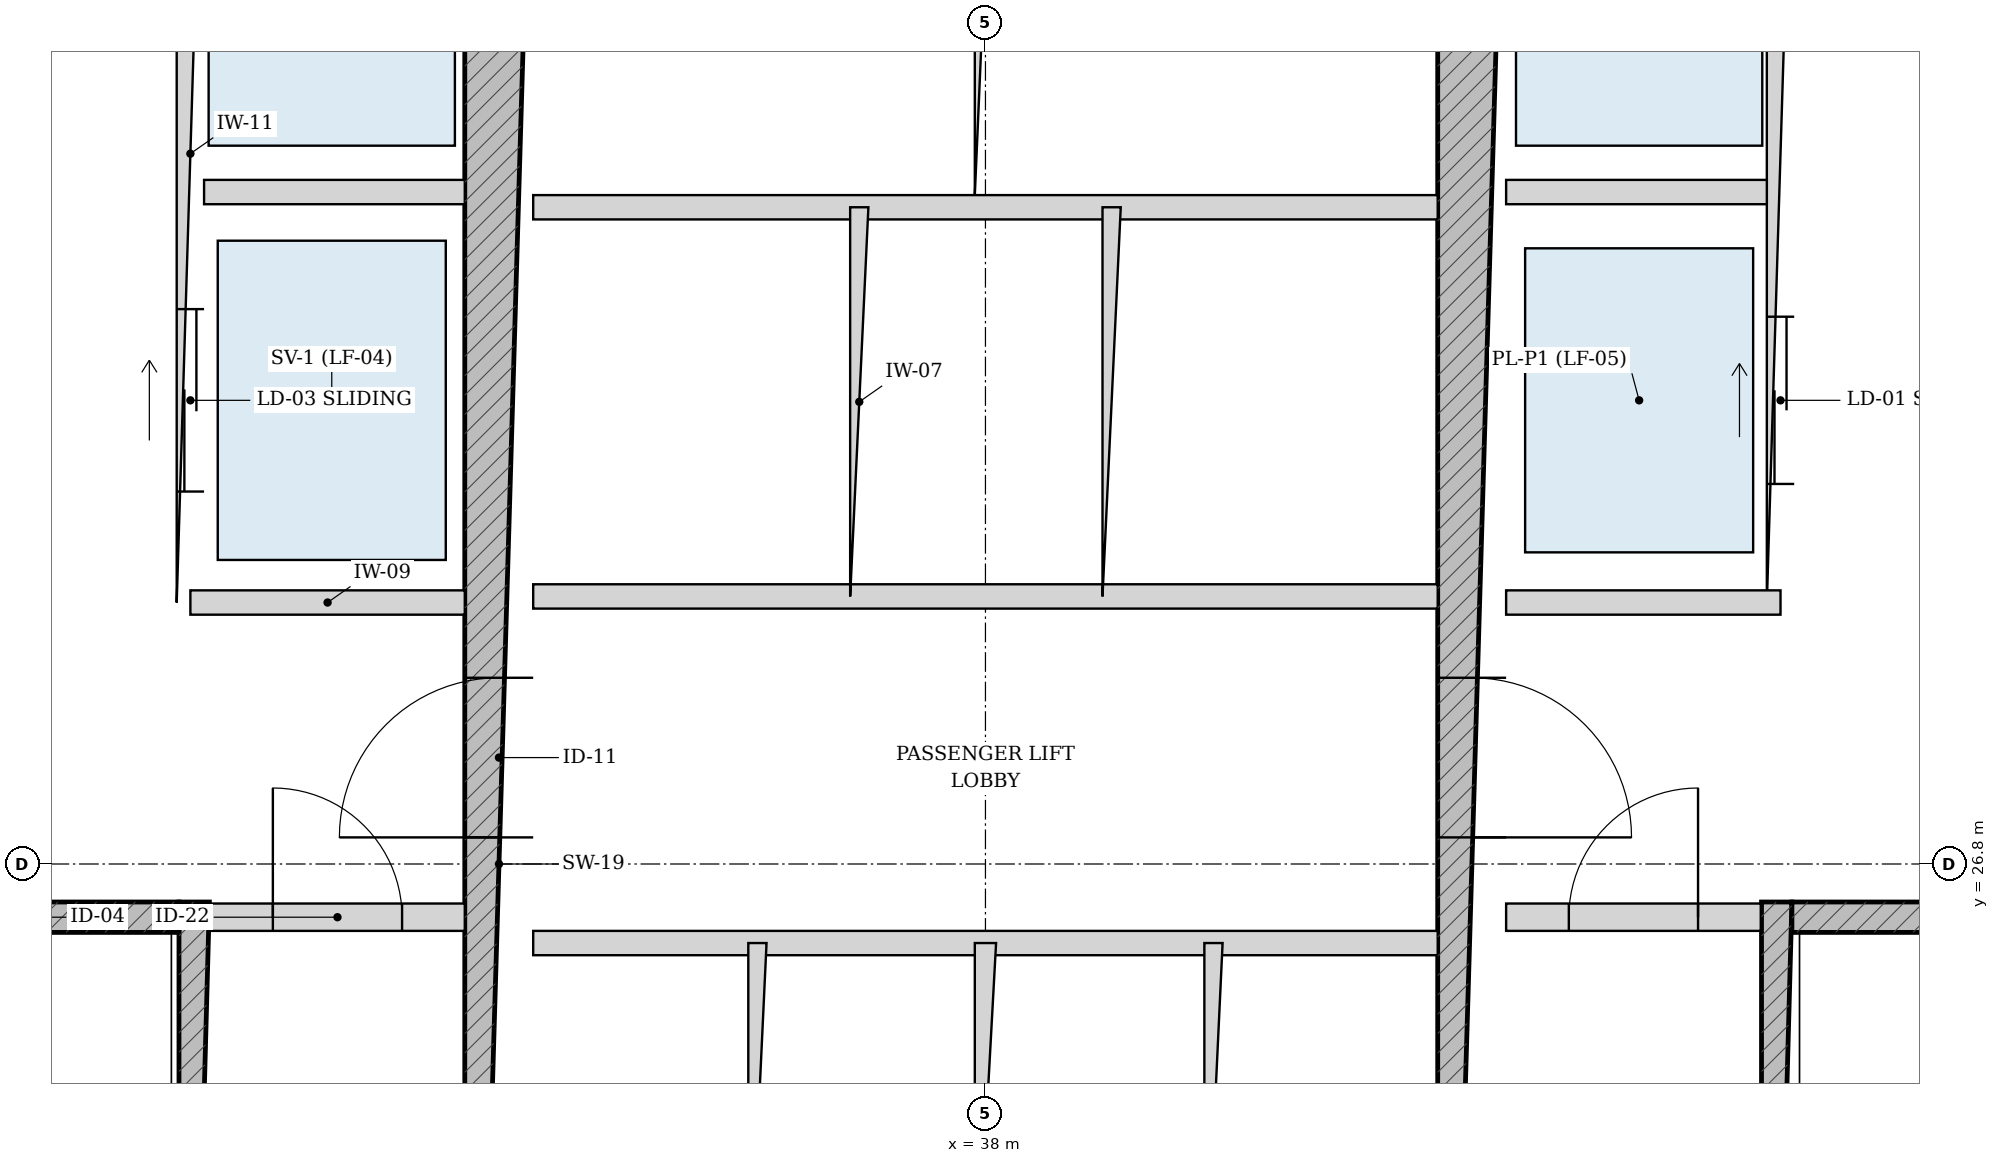
"""IFC4 building model, lengths in metres.
Left out: names, types, materials, properties, quantities, classifications, styles, units other than length and angle.
Written with IfcOpenShell. Run it as: python <this file> out.ifc"""

import sys

from ifc_helpers import new_model, si_unit, direction, frame, frame_2d, origin, place, context, subcontext, project, spatial, rectangle, extrude, source, transform, mapped, element, fill, save


model = new_model("IFC4")
c1 = context("Model", 3, precision=1e-05, world=origin(), true_north=direction((-0.2419218956, 0.970295726276)))
c2 = subcontext(c1, "Body", "Model", "MODEL_VIEW")
j1 = project(units=[si_unit("LENGTHUNIT", "METRE"), si_unit("PLANEANGLEUNIT", "RADIAN")], contexts=[c1])
p1 = place(None, origin())
s1 = spatial("IfcSite", under=j1, at=p1, CompositionType="ELEMENT")
p2 = place(p1, origin())
s2 = spatial("IfcBuilding", under=s1, at=p2, CompositionType="ELEMENT")
p3 = place(p2, frame((0.0, 0.0, -4.2)))
s3 = spatial("IfcBuildingStorey", under=s2, at=p3, CompositionType="ELEMENT", Elevation=-4.2)
p4 = place(p3, frame((32.795, 19.175, 0.0), z_axis=(0.0, 0.0, 1.0), x_axis=(0.0, 1.0, 0.0)))
e1 = element("IfcWall", 1, at=p4, inside=s3, PredefinedType="SOLIDWALL", context=c2, shape_type="SweptSolid", body=[
    extrude(rectangle(XDim=7.375, YDim=0.2, at=frame_2d((3.688, 0.0))), origin(), (0.0, 0.0, 1.0), 3.78),
])
p5 = place(p3, frame((29.375, 26.45, 0.0), z_axis=(0.0, 0.0, 1.0), x_axis=(1.0, 0.0, 0.0)))
e2 = element("IfcWall", 2, at=p5, inside=s3, PredefinedType="SOLIDWALL", context=c2, shape_type="SweptSolid", body=[
    extrude(rectangle(XDim=3.32, YDim=0.2, at=frame_2d((1.66, 0.0))), origin(), (0.0, 0.0, 1.0), 3.78),
])
p6 = place(p5, frame((1.185, 0.0, 0.0)))
e3 = element("IfcOpeningElement", 3, at=p6, cuts=e2, PredefinedType="OPENING", context=c2, shape_type="SweptSolid", body=[
    extrude(rectangle(XDim=0.95, YDim=2.15, at=frame_2d((0.475, 1.075))), frame((0.0, 0.11, 0.0), z_axis=(0.0, -1.0, 0.0), x_axis=(1.0, 0.0, 0.0)), (0.0, 0.0, 1.0), 0.22),
])
p7 = place(p3, frame((43.205, 19.175, 0.0), z_axis=(0.0, 0.0, 1.0), x_axis=(0.0, 1.0, 0.0)))
e4 = element("IfcWall", 4, at=p7, inside=s3, PredefinedType="SOLIDWALL", context=c2, shape_type="SweptSolid", body=[
    extrude(rectangle(XDim=7.375, YDim=0.2, at=frame_2d((3.688, 0.0))), origin(), (0.0, 0.0, 1.0), 3.78),
])
p8 = place(p3, frame((43.305, 26.45, 0.0), z_axis=(0.0, 0.0, 1.0), x_axis=(1.0, 0.0, 0.0)))
e5 = element("IfcWall", 5, at=p8, inside=s3, PredefinedType="SOLIDWALL", context=c2, shape_type="SweptSolid", body=[
    extrude(rectangle(XDim=3.32, YDim=0.2, at=frame_2d((1.66, 0.0))), origin(), (0.0, 0.0, 1.0), 3.78),
])
p9 = place(p8, frame((1.185, 0.0, 0.0)))
e6 = element("IfcOpeningElement", 6, at=p9, cuts=e5, PredefinedType="OPENING", context=c2, shape_type="SweptSolid", body=[
    extrude(rectangle(XDim=0.95, YDim=2.15, at=frame_2d((0.475, 1.075))), frame((0.0, 0.11, 0.0), z_axis=(0.0, -1.0, 0.0), x_axis=(1.0, 0.0, 0.0)), (0.0, 0.0, 1.0), 0.22),
])
p10 = place(p3, frame((34.8, 19.175, 0.0), z_axis=(0.0, 0.0, 1.0), x_axis=(0.0, 1.0, 0.0)))
e7 = element("IfcWall", 7, at=p10, inside=s3, PredefinedType="SHEAR", context=c2, shape_type="SweptSolid", body=[
    extrude(rectangle(XDim=15.25, YDim=0.45, at=frame_2d((7.625, 0.0))), origin(), (0.0, 0.0, 1.0), 3.78),
])
p11 = place(p10, frame((7.8, 0.0, 0.0)))
e8 = element("IfcOpeningElement", 8, at=p11, cuts=e7, PredefinedType="OPENING", context=c2, shape_type="SweptSolid", body=[
    extrude(rectangle(XDim=1.05, YDim=2.15, at=frame_2d((0.525, 1.075))), frame((0.0, 0.235, 0.0), z_axis=(0.0, -1.0, 0.0), x_axis=(1.0, 0.0, 0.0)), (0.0, 0.0, 1.0), 0.47),
])
p12 = place(p3, frame((41.2, 19.175, 0.0), z_axis=(0.0, 0.0, 1.0), x_axis=(0.0, 1.0, 0.0)))
e9 = element("IfcWall", 9, at=p12, inside=s3, PredefinedType="SHEAR", context=c2, shape_type="SweptSolid", body=[
    extrude(rectangle(XDim=15.25, YDim=0.45, at=frame_2d((7.625, 0.0))), origin(), (0.0, 0.0, 1.0), 3.78),
])
p13 = place(p12, frame((7.8, 0.0, 0.0)))
e10 = element("IfcOpeningElement", 10, at=p13, cuts=e9, PredefinedType="OPENING", context=c2, shape_type="SweptSolid", body=[
    extrude(rectangle(XDim=1.05, YDim=2.15, at=frame_2d((0.525, 1.075))), frame((0.0, 0.235, 0.0), z_axis=(0.0, -1.0, 0.0), x_axis=(1.0, 0.0, 0.0)), (0.0, 0.0, 1.0), 0.47),
])
p14 = place(p3, frame((32.9, 26.45, 0.0), z_axis=(0.0, 0.0, 1.0), x_axis=(1.0, 0.0, 0.0)))
e11 = element("IfcWall", 11, at=p14, inside=s3, PredefinedType="PARTITIONING", context=c2, shape_type="SweptSolid", body=[
    extrude(rectangle(XDim=1.675, YDim=0.18, at=frame_2d((0.837, 0.0))), origin(), (0.0, 0.0, 1.0), 3.78),
])
p15 = place(p14, frame((0.413, 0.0, 0.0)))
e12 = element("IfcOpeningElement", 12, at=p15, cuts=e11, PredefinedType="OPENING", context=c2, shape_type="SweptSolid", body=[
    extrude(rectangle(XDim=0.85, YDim=2.1, at=frame_2d((0.425, 1.05))), frame((0.0, 0.1, 0.0), z_axis=(0.0, -1.0, 0.0), x_axis=(1.0, 0.0, 0.0)), (0.0, 0.0, 1.0), 0.2),
])
p16 = place(p3, frame((41.425, 26.45, 0.0), z_axis=(0.0, 0.0, 1.0), x_axis=(1.0, 0.0, 0.0)))
e13 = element("IfcWall", 13, at=p16, inside=s3, PredefinedType="PARTITIONING", context=c2, shape_type="SweptSolid", body=[
    extrude(rectangle(XDim=1.675, YDim=0.18, at=frame_2d((0.837, 0.0))), origin(), (0.0, 0.0, 1.0), 3.78),
])
p17 = place(p16, frame((0.413, 0.0, 0.0)))
e14 = element("IfcOpeningElement", 14, at=p17, cuts=e13, PredefinedType="OPENING", context=c2, shape_type="SweptSolid", body=[
    extrude(rectangle(XDim=0.85, YDim=2.1, at=frame_2d((0.425, 1.05))), frame((0.0, 0.1, 0.0), z_axis=(0.0, -1.0, 0.0), x_axis=(1.0, 0.0, 0.0)), (0.0, 0.0, 1.0), 0.2),
])
p18 = place(p3, frame((32.77, 28.52, 0.0), z_axis=(0.0, 0.0, 1.0), x_axis=(0.0, 1.0, 0.0)))
e15 = element("IfcWall", 15, at=p18, inside=s3, PredefinedType="PARTITIONING", context=c2, shape_type="SweptSolid", body=[
    extrude(rectangle(XDim=5.905, YDim=0.18, at=frame_2d((2.953, 0.0))), origin(), (0.0, 0.0, 1.0), 3.78),
])
p19 = place(p18, frame((3.655, 0.0, 0.0)))
e16 = element("IfcOpeningElement", 16, at=p19, cuts=e15, PredefinedType="OPENING", context=c2, shape_type="SweptSolid", body=[
    extrude(rectangle(XDim=1.15, YDim=2.2, at=frame_2d((0.575, 1.1))), frame((0.0, 0.1, 0.0), z_axis=(0.0, -1.0, 0.0), x_axis=(1.0, 0.0, 0.0)), (0.0, 0.0, 1.0), 0.2),
])
p20 = place(p18, frame((0.73, 0.0, 0.0)))
e17 = element("IfcOpeningElement", 17, at=p20, cuts=e15, PredefinedType="OPENING", context=c2, shape_type="SweptSolid", body=[
    extrude(rectangle(XDim=1.2, YDim=2.25, at=frame_2d((0.6, 1.125))), frame((0.0, 0.1, 0.0), z_axis=(0.0, -1.0, 0.0), x_axis=(1.0, 0.0, 0.0)), (0.0, 0.0, 1.0), 0.2),
])
p21 = place(p3, frame((32.86, 31.22, 0.0), z_axis=(0.0, 0.0, 1.0), x_axis=(1.0, 0.0, 0.0)))
e18 = element("IfcWall", 18, at=p21, inside=s3, PredefinedType="PARTITIONING", context=c2, shape_type="SweptSolid", body=[
    extrude(rectangle(XDim=1.715, YDim=0.16, at=frame_2d((0.857, 0.0))), origin(), (0.0, 0.0, 1.0), 3.78),
])
p22 = place(p3, frame((32.77, 28.52, 0.0), z_axis=(0.0, 0.0, 1.0), x_axis=(1.0, 0.0, 0.0)))
e19 = element("IfcWall", 19, at=p22, inside=s3, PredefinedType="PARTITIONING", context=c2, shape_type="SweptSolid", body=[
    extrude(rectangle(XDim=1.805, YDim=0.16, at=frame_2d((0.902, 0.0))), origin(), (0.0, 0.0, 1.0), 3.78),
])
p23 = place(p3, frame((43.23, 28.52, 0.0), z_axis=(0.0, 0.0, 1.0), x_axis=(0.0, 1.0, 0.0)))
e20 = element("IfcWall", 20, at=p23, inside=s3, PredefinedType="PARTITIONING", context=c2, shape_type="SweptSolid", body=[
    extrude(rectangle(XDim=5.905, YDim=0.18, at=frame_2d((2.953, 0.0))), origin(), (0.0, 0.0, 1.0), 3.78),
])
p24 = place(p23, frame((3.655, 0.0, 0.0)))
e21 = element("IfcOpeningElement", 21, at=p24, cuts=e20, PredefinedType="OPENING", context=c2, shape_type="SweptSolid", body=[
    extrude(rectangle(XDim=1.15, YDim=2.2, at=frame_2d((0.575, 1.1))), frame((0.0, 0.1, 0.0), z_axis=(0.0, -1.0, 0.0), x_axis=(1.0, 0.0, 0.0)), (0.0, 0.0, 1.0), 0.2),
])
p25 = place(p23, frame((0.78, 0.0, 0.0)))
e22 = element("IfcOpeningElement", 22, at=p25, cuts=e20, PredefinedType="OPENING", context=c2, shape_type="SweptSolid", body=[
    extrude(rectangle(XDim=1.1, YDim=2.2, at=frame_2d((0.55, 1.1))), frame((0.0, 0.1, 0.0), z_axis=(0.0, -1.0, 0.0), x_axis=(1.0, 0.0, 0.0)), (0.0, 0.0, 1.0), 0.2),
])
p26 = place(p3, frame((41.425, 31.22, 0.0), z_axis=(0.0, 0.0, 1.0), x_axis=(1.0, 0.0, 0.0)))
e23 = element("IfcWall", 23, at=p26, inside=s3, PredefinedType="PARTITIONING", context=c2, shape_type="SweptSolid", body=[
    extrude(rectangle(XDim=1.715, YDim=0.16, at=frame_2d((0.857, 0.0))), origin(), (0.0, 0.0, 1.0), 3.78),
])
p27 = place(p3, frame((41.425, 28.52, 0.0), z_axis=(0.0, 0.0, 1.0), x_axis=(1.0, 0.0, 0.0)))
e24 = element("IfcWall", 24, at=p27, inside=s3, PredefinedType="PARTITIONING", context=c2, shape_type="SweptSolid", body=[
    extrude(rectangle(XDim=1.805, YDim=0.16, at=frame_2d((0.902, 0.0))), origin(), (0.0, 0.0, 1.0), 3.78),
])
for number, where, z_axis, x_axis in (
    (25, (35.025, 28.56, 0.0), (0.0, 0.0, 1.0), (1.0, 0.0, 0.0)),
    (26, (35.025, 31.12, 0.0), (0.0, 0.0, 1.0), (1.0, 0.0, 0.0)),
):
    element("IfcWall", number, at=place(p3, frame(where, z_axis=z_axis, x_axis=x_axis)), inside=s3, PredefinedType="PARTITIONING", context=c2, shape_type="SweptSolid", body=[
        extrude(rectangle(XDim=5.95, YDim=0.16, at=frame_2d((2.975, 0.0))), origin(), (0.0, 0.0, 1.0), 3.78),
    ])
for number, where, z_axis, x_axis in (
    (27, (37.17, 28.56, 0.0), (0.0, 0.0, 1.0), (0.0, 1.0, 0.0)),
    (28, (38.83, 28.56, 0.0), (0.0, 0.0, 1.0), (0.0, 1.0, 0.0)),
):
    element("IfcWall", number, at=place(p3, frame(where, z_axis=z_axis, x_axis=x_axis)), inside=s3, PredefinedType="PARTITIONING", context=c2, shape_type="SweptSolid", body=[
        extrude(rectangle(XDim=2.56, YDim=0.12, at=frame_2d((1.28, 0.0))), origin(), (0.0, 0.0, 1.0), 3.78),
    ])
p28 = place(p3, frame((38.0, 31.2, 0.0), z_axis=(0.0, 0.0, 1.0), x_axis=(0.0, 1.0, 0.0)))
e29 = element("IfcWall", 29, at=p28, inside=s3, PredefinedType="PARTITIONING", context=c2, shape_type="SweptSolid", body=[
    extrude(rectangle(XDim=3.225, YDim=0.14, at=frame_2d((1.613, 0.0))), origin(), (0.0, 0.0, 1.0), 3.78),
])
p29 = place(p3, frame((35.025, 26.28, 0.0), z_axis=(0.0, 0.0, 1.0), x_axis=(1.0, 0.0, 0.0)))
e30 = element("IfcWall", 30, at=p29, inside=s3, PredefinedType="PARTITIONING", context=c2, shape_type="SweptSolid", body=[
    extrude(rectangle(XDim=5.95, YDim=0.16, at=frame_2d((2.975, 0.0))), origin(), (0.0, 0.0, 1.0), 3.78),
])
p30 = place(p3, frame((36.5, 23.72, 0.0), z_axis=(0.0, 0.0, 1.0), x_axis=(0.0, 1.0, 0.0)))
e31 = element("IfcWall", 31, at=p30, inside=s3, PredefinedType="PARTITIONING", context=c2, shape_type="SweptSolid", body=[
    extrude(rectangle(XDim=2.56, YDim=0.12, at=frame_2d((1.28, 0.0))), origin(), (0.0, 0.0, 1.0), 3.78),
])
p31 = place(p3, frame((38.0, 23.72, 0.0), z_axis=(0.0, 0.0, 1.0), x_axis=(0.0, 1.0, 0.0)))
e32 = element("IfcWall", 32, at=p31, inside=s3, PredefinedType="PARTITIONING", context=c2, shape_type="SweptSolid", body=[
    extrude(rectangle(XDim=2.56, YDim=0.14, at=frame_2d((1.28, 0.0))), origin(), (0.0, 0.0, 1.0), 3.78),
])
p32 = place(p3, frame((39.5, 23.72, 0.0), z_axis=(0.0, 0.0, 1.0), x_axis=(0.0, 1.0, 0.0)))
e33 = element("IfcWall", 33, at=p32, inside=s3, PredefinedType="PARTITIONING", context=c2, shape_type="SweptSolid", body=[
    extrude(rectangle(XDim=2.56, YDim=0.12, at=frame_2d((1.28, 0.0))), origin(), (0.0, 0.0, 1.0), 3.78),
])
m1 = source(origin(), c2, "Body", "SweptSolid", [
    extrude(rectangle(XDim=1.05, YDim=2.15, at=frame_2d((0.525, 1.075))), frame((0.0, 0.025, 0.0), z_axis=(0.0, -1.0, 0.0), x_axis=(1.0, 0.0, 0.0)), (0.0, 0.0, 1.0), 0.05),
])
p33 = place(p11, origin())
e34 = element("IfcDoor", 34, at=p33, inside=s3, OperationType="SINGLE_SWING_LEFT", PredefinedType="DOOR", context=c2, shape_type="MappedRepresentation", body=[
    mapped(m1, transform((0.0, 0.0, 0.0), scale=1.0)),
])
fill(e8, e34)
p34 = place(p13, frame((1.05, 0.0, 0.0), z_axis=(0.0, 0.0, 1.0), x_axis=(-1.0, 0.0, 0.0)))
e35 = element("IfcDoor", 35, at=p34, inside=s3, OperationType="SINGLE_SWING_RIGHT", PredefinedType="DOOR", context=c2, shape_type="MappedRepresentation", body=[
    mapped(m1, transform((0.0, 0.0, 0.0), scale=1.0)),
])
fill(e10, e35)
m2 = source(origin(), c2, "Body", "SweptSolid", [
    extrude(rectangle(XDim=0.85, YDim=2.1, at=frame_2d((0.425, 1.05))), frame((0.0, 0.025, 0.0), z_axis=(0.0, -1.0, 0.0), x_axis=(1.0, 0.0, 0.0)), (0.0, 0.0, 1.0), 0.05),
])
p35 = place(p15, origin())
e36 = element("IfcDoor", 36, at=p35, inside=s3, OperationType="SINGLE_SWING_LEFT", PredefinedType="DOOR", context=c2, shape_type="MappedRepresentation", body=[
    mapped(m2, transform((0.0, 0.0, 0.0), scale=1.0)),
])
fill(e12, e36)
p36 = place(p17, origin())
e37 = element("IfcDoor", 37, at=p36, inside=s3, OperationType="SINGLE_SWING_RIGHT", PredefinedType="DOOR", context=c2, shape_type="MappedRepresentation", body=[
    mapped(m2, transform((0.0, 0.0, 0.0), scale=1.0)),
])
fill(e14, e37)
m3 = source(origin(), c2, "Body", "SweptSolid", [
    extrude(rectangle(XDim=1.2, YDim=2.25, at=frame_2d((0.6, 1.125))), frame((0.0, 0.025, 0.0), z_axis=(0.0, -1.0, 0.0), x_axis=(1.0, 0.0, 0.0)), (0.0, 0.0, 1.0), 0.05),
])
p37 = place(p20, origin())
e38 = element("IfcDoor", 38, at=p37, inside=s3, OperationType="DOUBLE_DOOR_SLIDING", PredefinedType="DOOR", context=c2, shape_type="MappedRepresentation", body=[
    mapped(m3, transform((0.0, 0.0, 0.0), scale=1.0)),
])
fill(e17, e38)
m4 = source(origin(), c2, "Body", "SweptSolid", [
    extrude(rectangle(XDim=1.1, YDim=2.2, at=frame_2d((0.55, 1.1))), frame((0.0, 0.025, 0.0), z_axis=(0.0, -1.0, 0.0), x_axis=(1.0, 0.0, 0.0)), (0.0, 0.0, 1.0), 0.05),
])
p38 = place(p25, origin())
e39 = element("IfcDoor", 39, at=p38, inside=s3, OperationType="DOUBLE_DOOR_SLIDING", PredefinedType="DOOR", context=c2, shape_type="MappedRepresentation", body=[
    mapped(m4, transform((0.0, 0.0, 0.0), scale=1.0)),
])
fill(e22, e39)
save(model, sys.argv[1])
